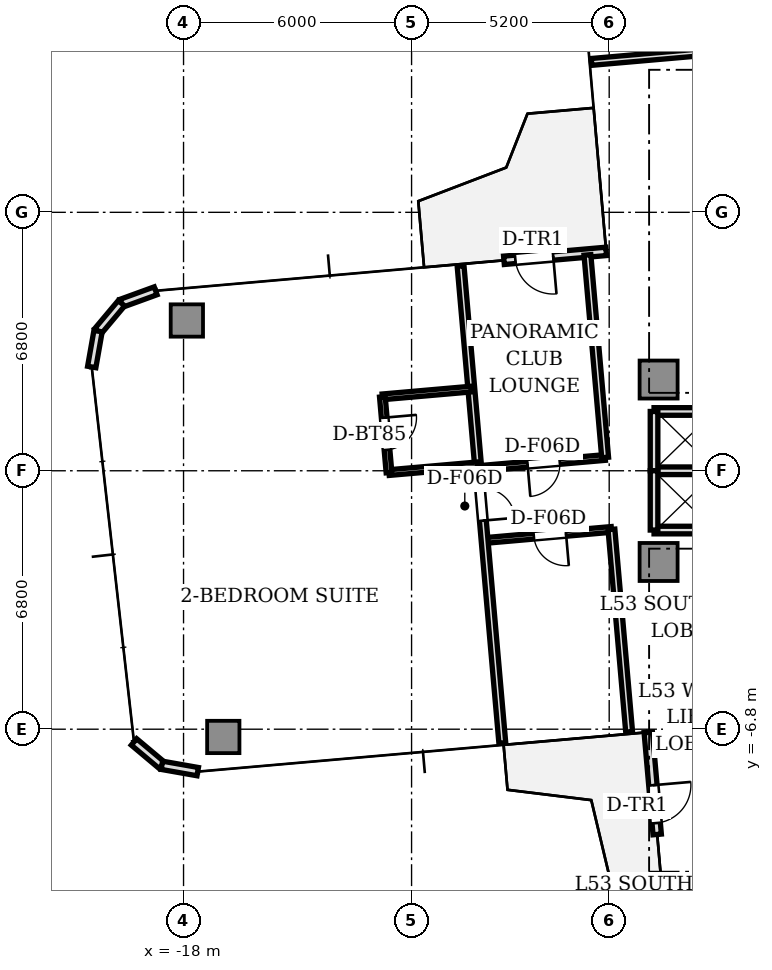
"""IFC4 building model, lengths in metres.
Left out: names, types, materials, properties, quantities, classifications, styles, units other than length and angle.
Written with IfcOpenShell. Run it as: python <this file> out.ifc"""

import sys

from ifc_helpers import new_model, si_unit, direction, frame, frame_2d, origin, origin_2d, place, context, subcontext, project, spatial, rectangle, extrude, source, transform, mapped, element, fill, save


model = new_model("IFC4")
c1 = context("Model", 3, precision=1e-05, world=origin(), true_north=direction((0.0, 1.0)))
c2 = subcontext(c1, "Body", "Model", "MODEL_VIEW")
j1 = project(units=[si_unit("LENGTHUNIT", "METRE"), si_unit("PLANEANGLEUNIT", "RADIAN")], contexts=[c1])
p1 = place(None, origin())
s1 = spatial("IfcSite", under=j1, at=p1, CompositionType="ELEMENT")
p2 = place(p1, origin())
s2 = spatial("IfcBuilding", under=s1, at=p2, CompositionType="ELEMENT")
p3 = place(p2, frame((0.0, 0.0, 191.95)))
s3 = spatial("IfcBuildingStorey", under=s2, at=p3, CompositionType="ELEMENT", Elevation=191.95)
m1 = source(origin(), c2, "Body", "SweptSolid", [
    extrude(rectangle(XDim=1.0, YDim=1.0, at=origin_2d()), origin(), (0.0, 0.0, 1.0), 3.11),
])
for number, where, z_axis, x_axis in (
    (1, (-5.5, 2.4, 0.0), (0.0, 0.0, 1.0), (1.0, 0.0, 0.0)),
    (2, (-5.5, -2.4, 0.0), (0.0, 0.0, 1.0), (1.0, 0.0, 0.0)),
):
    element("IfcColumn", number, at=place(p3, frame(where, z_axis=z_axis, x_axis=x_axis)), inside=s3, PredefinedType="COLUMN", context=c2, shape_type="MappedRepresentation", body=[
        mapped(m1, transform((0.0, 0.0, 0.0), scale=1.0)),
    ])
m2 = source(origin(), c2, "Body", "SweptSolid", [
    extrude(rectangle(XDim=0.85, YDim=0.85, at=origin_2d()), origin(), (0.0, 0.0, 1.0), 3.11),
])
for number, where, z_axis, x_axis in (
    (3, (-17.913, 3.954, 0.0), (0.0, 0.0, 1.0), (1.0, 0.0, 0.0)),
    (4, (-16.954, -7.004, 0.0), (0.0, 0.0, 1.0), (1.0, 0.0, 0.0)),
):
    element("IfcColumn", number, at=place(p3, frame(where, z_axis=z_axis, x_axis=x_axis)), inside=s3, PredefinedType="COLUMN", context=c2, shape_type="MappedRepresentation", body=[
        mapped(m2, transform((0.0, 0.0, 0.0), scale=1.0)),
    ])
p4 = place(p3, frame((-6.879, 5.772, 0.0), z_axis=(0.0, 0.0, 1.0), x_axis=(-0.996193619346, -0.087168071984, 0.0)))
e5 = element("IfcWall", 5, at=p4, inside=s3, PredefinedType="STANDARD", context=c2, shape_type="SweptSolid", body=[
    extrude(rectangle(XDim=2.7, YDim=0.22, at=frame_2d((1.35, 0.0))), origin(), (0.0, 0.0, 1.0), 3.11),
])
p5 = place(p4, frame((1.4, 0.0, 0.0)))
e6 = element("IfcOpeningElement", 6, at=p5, cuts=e5, PredefinedType="OPENING", context=c2, shape_type="SweptSolid", body=[
    extrude(rectangle(XDim=1.0, YDim=2.2, at=frame_2d((0.5, 1.1))), frame((0.0, 0.12, 0.0), z_axis=(0.0, -1.0, 0.0), x_axis=(1.0, 0.0, 0.0)), (0.0, 0.0, 1.0), 0.24),
])
p6 = place(p3, frame((-18.734, 4.735, 0.0), z_axis=(0.0, 0.0, 1.0), x_axis=(-0.939741306239, -0.34188635151, 0.0)))
e7 = element("IfcWall", 7, at=p6, inside=s3, PredefinedType="STANDARD", context=c2, shape_type="SweptSolid", body=[
    extrude(rectangle(XDim=0.958, YDim=0.22, at=frame_2d((0.479, 0.0))), origin(), (0.0, 0.0, 1.0), 3.11),
])
for number, where, z_axis, x_axis in (
    (8, (-19.634, 4.408, 0.0), (0.0, 0.0, 1.0), (-0.643, -0.766, 0.0)),
    (9, (-20.25, 3.674, 0.0), (0.0, 0.0, 1.0), (-0.174, -0.985, 0.0)),
):
    element("IfcWall", number, at=place(p3, frame(where, z_axis=z_axis, x_axis=x_axis)), inside=s3, PredefinedType="STANDARD", context=c2, shape_type="SweptSolid", body=[
        extrude(rectangle(XDim=0.958, YDim=0.22, at=frame_2d((0.479, 0.0))), origin(), (0.0, 0.0, 1.0), 3.11),
    ])
p7 = place(p3, frame((-19.304, -7.135, 0.0), z_axis=(0.0, 0.0, 1.0), x_axis=(0.766001159887, -0.642839189107, 0.0)))
e10 = element("IfcWall", 10, at=p7, inside=s3, PredefinedType="STANDARD", context=c2, shape_type="SweptSolid", body=[
    extrude(rectangle(XDim=0.958, YDim=0.22, at=frame_2d((0.479, 0.0))), origin(), (0.0, 0.0, 1.0), 3.11),
])
p8 = place(p3, frame((-18.57, -7.75, 0.0), z_axis=(0.0, 0.0, 1.0), x_axis=(0.984770724397, -0.173858046606, 0.0)))
e11 = element("IfcWall", 11, at=p8, inside=s3, PredefinedType="STANDARD", context=c2, shape_type="SweptSolid", body=[
    extrude(rectangle(XDim=0.958, YDim=0.22, at=frame_2d((0.479, 0.0))), origin(), (0.0, 0.0, 1.0), 3.11),
])
p9 = place(p3, frame((-5.772, -6.879, 0.0), z_axis=(0.0, 0.0, 1.0), x_axis=(0.087168071984, -0.996193619346, 0.0)))
e12 = element("IfcWall", 12, at=p9, inside=s3, PredefinedType="STANDARD", context=c2, shape_type="SweptSolid", body=[
    extrude(rectangle(XDim=2.7, YDim=0.22, at=frame_2d((1.35, 0.0))), origin(), (0.0, 0.0, 1.0), 3.11),
])
p10 = place(p9, frame((1.4, 0.0, 0.0)))
e13 = element("IfcOpeningElement", 13, at=p10, cuts=e12, PredefinedType="OPENING", context=c2, shape_type="SweptSolid", body=[
    extrude(rectangle(XDim=1.0, YDim=2.2, at=frame_2d((0.5, 1.1))), frame((0.0, 0.12, 0.0), z_axis=(0.0, -1.0, 0.0), x_axis=(1.0, 0.0, 0.0)), (0.0, 0.0, 1.0), 0.24),
])
for number, where, z_axis, x_axis in (
    (14, (-5.62, 1.56, 0.0), (0.0, 0.0, 1.0), (1.0, 0.0, 0.0)),
    (15, (-5.62, -1.56, 0.0), (0.0, 0.0, 1.0), (1.0, 0.0, 0.0)),
    (16, (-5.62, 0.0, 0.0), (0.0, 0.0, 1.0), (1.0, 0.0, 0.0)),
):
    element("IfcWall", number, at=place(p3, frame(where, z_axis=z_axis, x_axis=x_axis)), inside=s3, PredefinedType="SOLIDWALL", context=c2, shape_type="SweptSolid", body=[
        extrude(rectangle(XDim=1.64, YDim=0.2, at=frame_2d((0.82, 0.0))), origin(), (0.0, 0.0, 1.0), 2.66),
    ])
for number, where, z_axis, x_axis in (
    (17, (-5.62, 0.0, 0.0), (0.0, 0.0, 1.0), (0.0, 1.0, 0.0)),
    (18, (-5.62, -1.56, 0.0), (0.0, 0.0, 1.0), (0.0, 1.0, 0.0)),
):
    element("IfcWall", number, at=place(p3, frame(where, z_axis=z_axis, x_axis=x_axis)), inside=s3, PredefinedType="SOLIDWALL", context=c2, shape_type="SweptSolid", body=[
        extrude(rectangle(XDim=1.56, YDim=0.2, at=frame_2d((0.78, 0.0))), origin(), (0.0, 0.0, 1.0), 2.66),
    ])
p11 = place(p3, frame((3.095, 11.664, 0.0), z_axis=(0.0, 0.0, 1.0), x_axis=(-0.996196061386, -0.087140158824, 0.0)))
e19 = element("IfcWall", 19, at=p11, inside=s3, PredefinedType="PARTITIONING", context=c2, shape_type="SweptSolid", body=[
    extrude(rectangle(XDim=10.4, YDim=0.18, at=frame_2d((5.2, 0.0))), origin(), (0.0, 0.0, 1.0), 2.66),
])
p12 = place(p3, frame((-6.741, -1.543, 0.0), z_axis=(0.0, 0.0, 1.0), x_axis=(-0.996193954812, -0.087164238054, 0.0)))
e20 = element("IfcWall", 20, at=p12, inside=s3, PredefinedType="PARTITIONING", context=c2, shape_type="SweptSolid", body=[
    extrude(rectangle(XDim=3.35, YDim=0.15, at=frame_2d((1.675, 0.0))), origin(), (0.0, 0.0, 1.0), 2.66),
])
p13 = place(p12, frame((1.2, 0.0, 0.0)))
e21 = element("IfcOpeningElement", 21, at=p13, cuts=e20, PredefinedType="OPENING", context=c2, shape_type="SweptSolid", body=[
    extrude(rectangle(XDim=0.85, YDim=2.1, at=frame_2d((0.425, 1.05))), frame((0.0, 0.085, 0.0), z_axis=(0.0, -1.0, 0.0), x_axis=(1.0, 0.0, 0.0)), (0.0, 0.0, 1.0), 0.17),
])
p14 = place(p3, frame((-6.907, 0.349, 0.0), z_axis=(0.0, 0.0, 1.0), x_axis=(-0.996193954812, -0.087164238054, 0.0)))
e22 = element("IfcWall", 22, at=p14, inside=s3, PredefinedType="PARTITIONING", context=c2, shape_type="SweptSolid", body=[
    extrude(rectangle(XDim=3.35, YDim=0.15, at=frame_2d((1.675, 0.0))), origin(), (0.0, 0.0, 1.0), 2.66),
])
p15 = place(p14, frame((1.2, 0.0, 0.0)))
e23 = element("IfcOpeningElement", 23, at=p15, cuts=e22, PredefinedType="OPENING", context=c2, shape_type="SweptSolid", body=[
    extrude(rectangle(XDim=0.85, YDim=2.1, at=frame_2d((0.425, 1.05))), frame((0.0, 0.085, 0.0), z_axis=(0.0, -1.0, 0.0), x_axis=(1.0, 0.0, 0.0)), (0.0, 0.0, 1.0), 0.17),
])
for number, where, z_axis, x_axis in (
    (24, (-6.741, -1.543, 0.0), (0.0, 0.0, 1.0), (0.087, -0.996, 0.0)),
    (25, (-7.373, 5.679, 0.0), (0.0, 0.0, 1.0), (0.087, -0.996, 0.0)),
):
    element("IfcWall", number, at=place(p3, frame(where, z_axis=z_axis, x_axis=x_axis)), inside=s3, PredefinedType="PARTITIONING", context=c2, shape_type="SweptSolid", body=[
        extrude(rectangle(XDim=5.35, YDim=0.18, at=frame_2d((2.675, 0.0))), origin(), (0.0, 0.0, 1.0), 2.66),
    ])
p16 = place(p3, frame((-10.71, 5.387, 0.0), z_axis=(0.0, 0.0, 1.0), x_axis=(0.087154691724, -0.996194790044, 0.0)))
e26 = element("IfcWall", 26, at=p16, inside=s3, PredefinedType="PARTITIONING", context=c2, shape_type="SweptSolid", body=[
    extrude(rectangle(XDim=12.6, YDim=0.18, at=frame_2d((6.3, 0.0))), origin(), (0.0, 0.0, 1.0), 2.66),
])
p17 = place(p16, frame((5.875, 0.0, 0.0)))
e27 = element("IfcOpeningElement", 27, at=p17, cuts=e26, PredefinedType="OPENING", context=c2, shape_type="SweptSolid", body=[
    extrude(rectangle(XDim=0.85, YDim=2.1, at=frame_2d((0.425, 1.05))), frame((0.0, 0.1, 0.0), z_axis=(0.0, -1.0, 0.0), x_axis=(1.0, 0.0, 0.0)), (0.0, 0.0, 1.0), 0.2),
])
for number, where, z_axis, x_axis in (
    (28, (-10.253, 0.157, 0.0), (0.0, 0.0, 1.0), (-0.996, -0.087, 0.0)),
    (29, (-10.427, 2.149, 0.0), (0.0, 0.0, 1.0), (-0.996, -0.087, 0.0)),
):
    element("IfcWall", number, at=place(p3, frame(where, z_axis=z_axis, x_axis=x_axis)), inside=s3, PredefinedType="PARTITIONING", context=c2, shape_type="SweptSolid", body=[
        extrude(rectangle(XDim=2.35, YDim=0.15, at=frame_2d((1.175, 0.0))), origin(), (0.0, 0.0, 1.0), 2.66),
    ])
p18 = place(p3, frame((-12.768, 1.945, 0.0), z_axis=(0.0, 0.0, 1.0), x_axis=(0.087156350505, -0.99619464492, 0.0)))
e30 = element("IfcWall", 30, at=p18, inside=s3, PredefinedType="PARTITIONING", context=c2, shape_type="SweptSolid", body=[
    extrude(rectangle(XDim=2.0, YDim=0.15, at=frame_2d((1.0, 0.0))), origin(), (0.0, 0.0, 1.0), 2.66),
])
p19 = place(p18, frame((0.55, 0.0, 0.0)))
e31 = element("IfcOpeningElement", 31, at=p19, cuts=e30, PredefinedType="OPENING", context=c2, shape_type="SweptSolid", body=[
    extrude(rectangle(XDim=0.85, YDim=2.1, at=frame_2d((0.425, 1.05))), frame((0.0, 0.085, 0.0), z_axis=(0.0, -1.0, 0.0), x_axis=(1.0, 0.0, 0.0)), (0.0, 0.0, 1.0), 0.17),
])
p20 = place(p3, frame((-5.287, -11.856, 0.0), z_axis=(0.0, 0.0, 1.0), x_axis=(0.996194023261, 0.087163455754, 0.0)))
e32 = element("IfcWall", 32, at=p20, inside=s3, PredefinedType="PARTITIONING", context=c2, shape_type="SweptSolid", body=[
    extrude(rectangle(XDim=10.4, YDim=0.18, at=frame_2d((5.2, 0.0))), origin(), (0.0, 0.0, 1.0), 2.66),
])
m3 = source(origin(), c2, "Body", "SweptSolid", [
    extrude(rectangle(XDim=1.0, YDim=0.05, at=origin_2d()), origin(), (0.0, 0.0, 1.0), 2.2),
])
p21 = place(p5, frame((0.5, 0.0, 0.0)))
e33 = element("IfcDoor", 33, at=p21, inside=s3, OperationType="SINGLE_SWING_LEFT", PredefinedType="DOOR", context=c2, shape_type="MappedRepresentation", body=[
    mapped(m3, transform((0.0, 0.0, 0.0), scale=1.0)),
])
fill(e6, e33)
p22 = place(p10, frame((0.5, 0.0, 0.0)))
e34 = element("IfcDoor", 34, at=p22, inside=s3, OperationType="SINGLE_SWING_LEFT", PredefinedType="DOOR", context=c2, shape_type="MappedRepresentation", body=[
    mapped(m3, transform((0.0, 0.0, 0.0), scale=1.0)),
])
fill(e13, e34)
m4 = source(origin(), c2, "Body", "SweptSolid", [
    extrude(rectangle(XDim=0.85, YDim=0.05, at=origin_2d()), origin(), (0.0, 0.0, 1.0), 2.1),
])
p23 = place(p13, frame((0.425, 0.0, 0.0)))
e35 = element("IfcDoor", 35, at=p23, inside=s3, OperationType="SINGLE_SWING_LEFT", PredefinedType="DOOR", context=c2, shape_type="MappedRepresentation", body=[
    mapped(m4, transform((0.0, 0.0, 0.0), scale=1.0)),
])
fill(e21, e35)
p24 = place(p15, frame((0.425, 0.0, 0.0)))
e36 = element("IfcDoor", 36, at=p24, inside=s3, OperationType="SINGLE_SWING_RIGHT", PredefinedType="DOOR", context=c2, shape_type="MappedRepresentation", body=[
    mapped(m4, transform((0.0, 0.0, 0.0), scale=1.0)),
])
fill(e23, e36)
p25 = place(p19, frame((0.425, 0.0, 0.0)))
e37 = element("IfcDoor", 37, at=p25, inside=s3, OperationType="SINGLE_SWING_LEFT", PredefinedType="DOOR", context=c2, shape_type="MappedRepresentation", body=[
    mapped(m4, transform((0.0, 0.0, 0.0), scale=1.0)),
])
fill(e31, e37)
p26 = place(p17, frame((0.425, 0.0, 0.0)))
e38 = element("IfcDoor", 38, at=p26, inside=s3, OperationType="SINGLE_SWING_RIGHT", PredefinedType="DOOR", context=c2, shape_type="MappedRepresentation", body=[
    mapped(m4, transform((0.0, 0.0, 0.0), scale=1.0)),
])
fill(e27, e38)
save(model, sys.argv[1])
